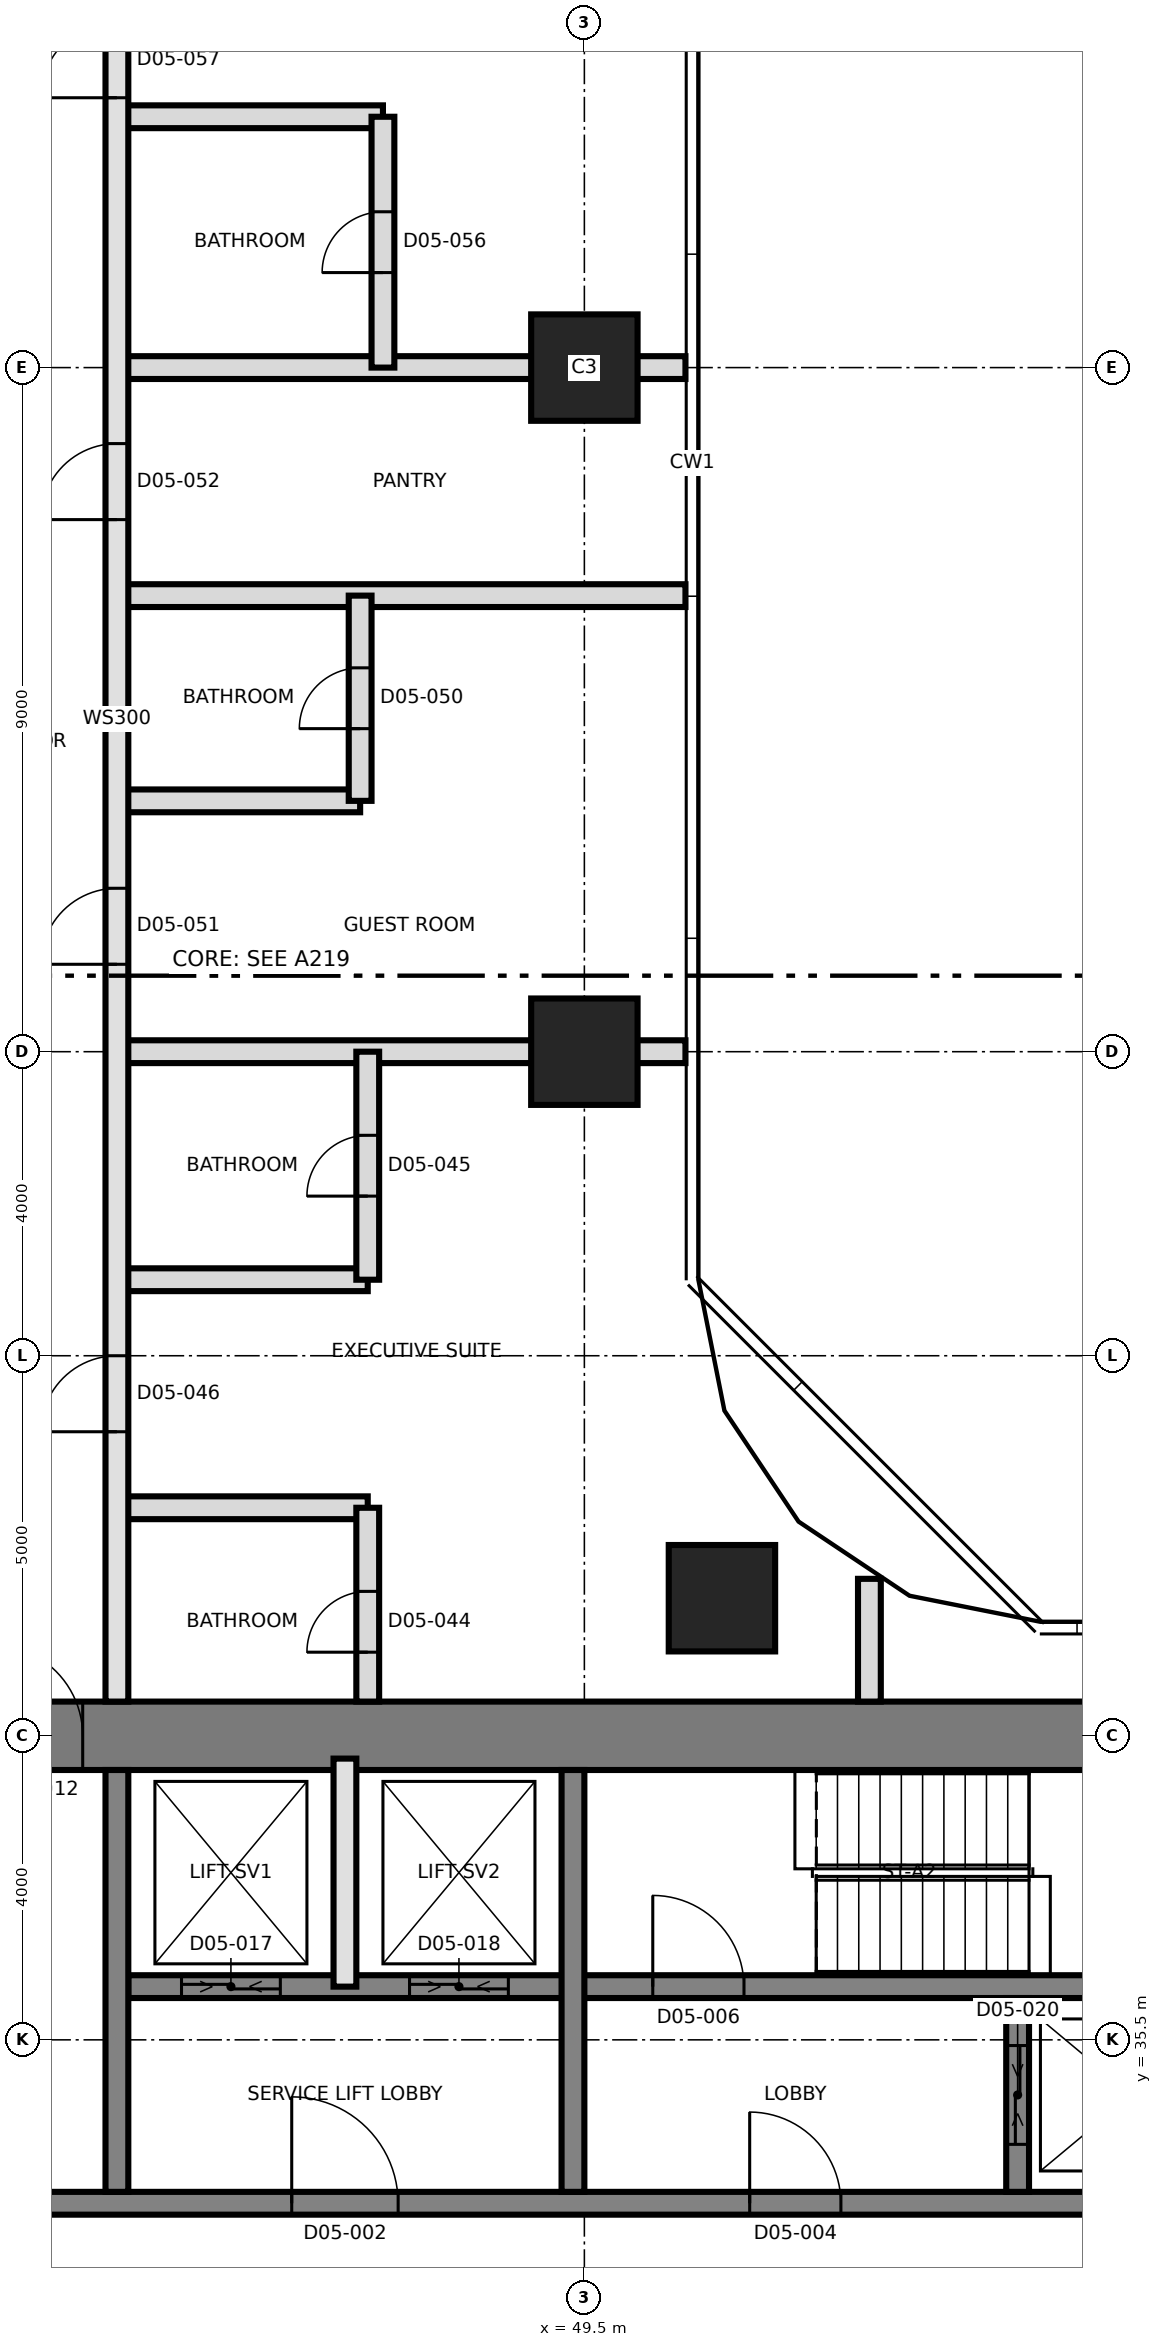
"""IFC4 building model, lengths in metres.
Left out: names, types, materials, properties, quantities, classifications, styles, units other than length and angle.
Written with IfcOpenShell. Run it as: python <this file> out.ifc"""

import sys

from ifc_helpers import new_model, si_unit, direction, frame, frame_2d, origin, origin_2d, place, context, subcontext, project, spatial, rectangle, extrude, element, fill, save


model = new_model("IFC4")
c1 = context("Model", 3, precision=1e-05, world=origin(), true_north=direction((0.0, 1.0)))
c2 = subcontext(c1, "Body", "Model", "MODEL_VIEW")
j1 = project(units=[si_unit("LENGTHUNIT", "METRE"), si_unit("PLANEANGLEUNIT", "RADIAN")], contexts=[c1])
p1 = place(None, origin())
s1 = spatial("IfcSite", under=j1, at=p1, CompositionType="ELEMENT")
p2 = place(p1, origin())
s2 = spatial("IfcBuilding", under=s1, at=p2, CompositionType="ELEMENT")
p3 = place(p2, frame((0.0, 0.0, 70.5)))
s3 = spatial("IfcBuildingStorey", under=s2, at=p3, CompositionType="ELEMENT", Elevation=70.5)
p4 = place(p3, frame((31.05, 39.5, 0.0), z_axis=(0.0, 0.0, 1.0), x_axis=(1.0, 0.0, 0.0)))
e1 = element("IfcWall", 1, at=p4, inside=s3, PredefinedType="SHEAR", context=c2, shape_type="SweptSolid", body=[
    extrude(rectangle(XDim=27.0, YDim=0.9, at=frame_2d((13.5, 0.0))), origin(), (0.0, 0.0, 1.0), 3.7),
])
p5 = place(p4, frame((10.65, 0.0, 0.0)))
e2 = element("IfcOpeningElement", 2, at=p5, cuts=e1, PredefinedType="OPENING", context=c2, shape_type="SweptSolid", body=[
    extrude(rectangle(XDim=1.2, YDim=2.1, at=frame_2d((0.6, 1.05))), frame((0.0, 0.46, 0.0), z_axis=(0.0, -1.0, 0.0), x_axis=(1.0, 0.0, 0.0)), (0.0, 0.0, 1.0), 0.92),
])
p6 = place(p3, frame((31.95, 33.35, 0.0), z_axis=(0.0, 0.0, 1.0), x_axis=(1.0, 0.0, 0.0)))
e3 = element("IfcWall", 3, at=p6, inside=s3, PredefinedType="SHEAR", context=c2, shape_type="SweptSolid", body=[
    extrude(rectangle(XDim=26.1, YDim=0.3, at=frame_2d((13.05, 0.0))), origin(), (0.0, 0.0, 1.0), 3.7),
])
p7 = place(p6, frame((13.7, 0.0, 0.0)))
e4 = element("IfcOpeningElement", 4, at=p7, cuts=e3, PredefinedType="OPENING", context=c2, shape_type="SweptSolid", body=[
    extrude(rectangle(XDim=1.4, YDim=2.1, at=frame_2d((0.7, 1.05))), frame((0.0, 0.16, 0.0), z_axis=(0.0, -1.0, 0.0), x_axis=(1.0, 0.0, 0.0)), (0.0, 0.0, 1.0), 0.32),
])
p8 = place(p6, frame((5.175, 0.0, 0.0)))
e5 = element("IfcOpeningElement", 5, at=p8, cuts=e3, PredefinedType="OPENING", context=c2, shape_type="SweptSolid", body=[
    extrude(rectangle(XDim=1.2, YDim=2.1, at=frame_2d((0.6, 1.05))), frame((0.0, 0.16, 0.0), z_axis=(0.0, -1.0, 0.0), x_axis=(1.0, 0.0, 0.0)), (0.0, 0.0, 1.0), 0.32),
])
p9 = place(p6, frame((19.725, 0.0, 0.0)))
e6 = element("IfcOpeningElement", 6, at=p9, cuts=e3, PredefinedType="OPENING", context=c2, shape_type="SweptSolid", body=[
    extrude(rectangle(XDim=1.2, YDim=2.1, at=frame_2d((0.6, 1.05))), frame((0.0, 0.16, 0.0), z_axis=(0.0, -1.0, 0.0), x_axis=(1.0, 0.0, 0.0)), (0.0, 0.0, 1.0), 0.32),
])
p10 = place(p3, frame((43.5, 36.2, 0.0), z_axis=(0.0, 0.0, 1.0), x_axis=(1.0, 0.0, 0.0)))
e7 = element("IfcWall", 7, at=p10, inside=s3, PredefinedType="SHEAR", context=c2, shape_type="SweptSolid", body=[
    extrude(rectangle(XDim=14.55, YDim=0.3, at=frame_2d((7.275, 0.0))), origin(), (0.0, 0.0, 1.0), 3.7),
])
p11 = place(p10, frame((6.9, 0.0, 0.0)))
e8 = element("IfcOpeningElement", 8, at=p11, cuts=e7, PredefinedType="OPENING", context=c2, shape_type="SweptSolid", body=[
    extrude(rectangle(XDim=1.2, YDim=2.1, at=frame_2d((0.6, 1.05))), frame((0.0, 0.16, 0.0), z_axis=(0.0, -1.0, 0.0), x_axis=(1.0, 0.0, 0.0)), (0.0, 0.0, 1.0), 0.32),
])
p12 = place(p10, frame((0.7, 0.0, 0.0)))
e9 = element("IfcOpeningElement", 9, at=p12, cuts=e7, PredefinedType="OPENING", context=c2, shape_type="SweptSolid", body=[
    extrude(rectangle(XDim=1.3, YDim=2.4, at=frame_2d((0.65, 1.2))), frame((0.0, 0.16, 0.0), z_axis=(0.0, -1.0, 0.0), x_axis=(1.0, 0.0, 0.0)), (0.0, 0.0, 1.0), 0.32),
])
p13 = place(p10, frame((3.7, 0.0, 0.0)))
e10 = element("IfcOpeningElement", 10, at=p13, cuts=e7, PredefinedType="OPENING", context=c2, shape_type="SweptSolid", body=[
    extrude(rectangle(XDim=1.3, YDim=2.4, at=frame_2d((0.65, 1.2))), frame((0.0, 0.16, 0.0), z_axis=(0.0, -1.0, 0.0), x_axis=(1.0, 0.0, 0.0)), (0.0, 0.0, 1.0), 0.32),
])
for number, where, z_axis, x_axis in (
    (11, (43.35, 33.5, 0.0), (0.0, 0.0, 1.0), (0.0, 1.0, 0.0)),
    (12, (49.35, 33.5, 0.0), (0.0, 0.0, 1.0), (0.0, 1.0, 0.0)),
):
    element("IfcWall", number, at=place(p3, frame(where, z_axis=z_axis, x_axis=x_axis)), inside=s3, PredefinedType="SHEAR", context=c2, shape_type="SweptSolid", body=[
        extrude(rectangle(XDim=5.55, YDim=0.3, at=frame_2d((2.775, 0.0))), origin(), (0.0, 0.0, 1.0), 3.7),
    ])
p14 = place(p3, frame((55.2, 33.5, 0.0), z_axis=(0.0, 0.0, 1.0), x_axis=(0.0, 1.0, 0.0)))
e13 = element("IfcWall", 13, at=p14, inside=s3, PredefinedType="SHEAR", context=c2, shape_type="SweptSolid", body=[
    extrude(rectangle(XDim=2.55, YDim=0.3, at=frame_2d((1.275, 0.0))), origin(), (0.0, 0.0, 1.0), 3.7),
])
p15 = place(p14, frame((0.625, 0.0, 0.0)))
e14 = element("IfcOpeningElement", 14, at=p15, cuts=e13, PredefinedType="OPENING", context=c2, shape_type="SweptSolid", body=[
    extrude(rectangle(XDim=1.3, YDim=2.4, at=frame_2d((0.65, 1.2))), frame((0.0, 0.16, 0.0), z_axis=(0.0, -1.0, 0.0), x_axis=(1.0, 0.0, 0.0)), (0.0, 0.0, 1.0), 0.32),
])
for number, where, z_axis, x_axis in (
    (15, (51.31, 41.31, 0.0), (0.0, 0.0, 1.0), (1.0, 0.0, 0.0)),
    (16, (49.5, 48.5, 0.0), (0.0, 0.0, 1.0), (1.0, 0.0, 0.0)),
    (17, (49.5, 57.5, 0.0), (0.0, 0.0, 1.0), (1.0, 0.0, 0.0)),
):
    element("IfcColumn", number, at=place(p3, frame(where, z_axis=z_axis, x_axis=x_axis)), inside=s3, PredefinedType="COLUMN", context=c2, shape_type="SweptSolid", body=[
        extrude(rectangle(XDim=1.4, YDim=1.4, at=origin_2d()), origin(), (0.0, 0.0, 1.0), 3.7),
    ])
p16 = place(p3, frame((46.35, 36.2, 0.0), z_axis=(0.0, 0.0, 1.0), x_axis=(0.0, 1.0, 0.0)))
e18 = element("IfcWall", 18, at=p16, inside=s3, PredefinedType="SOLIDWALL", context=c2, shape_type="SweptSolid", body=[
    extrude(rectangle(XDim=3.0, YDim=0.3, at=frame_2d((1.5, 0.0))), origin(), (0.0, 0.0, 1.0), 3.4),
])
for number, where, z_axis, x_axis in (
    (19, (43.35, 42.5, 0.0), (0.0, 0.0, 1.0), (1.0, 0.0, 0.0)),
    (20, (43.35, 45.5, 0.0), (0.0, 0.0, 1.0), (1.0, 0.0, 0.0)),
):
    element("IfcWall", number, at=place(p3, frame(where, z_axis=z_axis, x_axis=x_axis)), inside=s3, PredefinedType="PARTITIONING", context=c2, shape_type="SweptSolid", body=[
        extrude(rectangle(XDim=3.3, YDim=0.3, at=frame_2d((1.65, 0.0))), origin(), (0.0, 0.0, 1.0), 3.4),
    ])
p17 = place(p3, frame((43.35, 48.5, 0.0), z_axis=(0.0, 0.0, 1.0), x_axis=(1.0, 0.0, 0.0)))
e21 = element("IfcWall", 21, at=p17, inside=s3, PredefinedType="PARTITIONING", context=c2, shape_type="SweptSolid", body=[
    extrude(rectangle(XDim=7.48, YDim=0.3, at=frame_2d((3.74, 0.0))), origin(), (0.0, 0.0, 1.0), 3.4),
])
p18 = place(p3, frame((43.35, 51.8, 0.0), z_axis=(0.0, 0.0, 1.0), x_axis=(1.0, 0.0, 0.0)))
e22 = element("IfcWall", 22, at=p18, inside=s3, PredefinedType="PARTITIONING", context=c2, shape_type="SweptSolid", body=[
    extrude(rectangle(XDim=3.2, YDim=0.3, at=frame_2d((1.6, 0.0))), origin(), (0.0, 0.0, 1.0), 3.4),
])
for number, where, z_axis, x_axis in (
    (23, (43.35, 54.5, 0.0), (0.0, 0.0, 1.0), (1.0, 0.0, 0.0)),
    (24, (43.35, 57.5, 0.0), (0.0, 0.0, 1.0), (1.0, 0.0, 0.0)),
):
    element("IfcWall", number, at=place(p3, frame(where, z_axis=z_axis, x_axis=x_axis)), inside=s3, PredefinedType="PARTITIONING", context=c2, shape_type="SweptSolid", body=[
        extrude(rectangle(XDim=7.48, YDim=0.3, at=frame_2d((3.74, 0.0))), origin(), (0.0, 0.0, 1.0), 3.4),
    ])
p19 = place(p3, frame((43.35, 60.8, 0.0), z_axis=(0.0, 0.0, 1.0), x_axis=(1.0, 0.0, 0.0)))
e25 = element("IfcWall", 25, at=p19, inside=s3, PredefinedType="PARTITIONING", context=c2, shape_type="SweptSolid", body=[
    extrude(rectangle(XDim=3.5, YDim=0.3, at=frame_2d((1.75, 0.0))), origin(), (0.0, 0.0, 1.0), 3.4),
])
p20 = place(p3, frame((43.35, 39.95, 0.0), z_axis=(0.0, 0.0, 1.0), x_axis=(0.0, 1.0, 0.0)))
e26 = element("IfcWall", 26, at=p20, inside=s3, PredefinedType="SOLIDWALL", context=c2, shape_type="SweptSolid", body=[
    extrude(rectangle(XDim=25.85, YDim=0.3, at=frame_2d((12.925, 0.0))), origin(), (0.0, 0.0, 1.0), 3.4),
])
p21 = place(p20, frame((3.55, 0.0, 0.0)))
e27 = element("IfcOpeningElement", 27, at=p21, cuts=e26, PredefinedType="OPENING", context=c2, shape_type="SweptSolid", body=[
    extrude(rectangle(XDim=1.0, YDim=2.4, at=frame_2d((0.5, 1.2))), frame((0.0, 0.16, 0.0), z_axis=(0.0, -1.0, 0.0), x_axis=(1.0, 0.0, 0.0)), (0.0, 0.0, 1.0), 0.32),
])
p22 = place(p20, frame((9.7, 0.0, 0.0)))
e28 = element("IfcOpeningElement", 28, at=p22, cuts=e26, PredefinedType="OPENING", context=c2, shape_type="SweptSolid", body=[
    extrude(rectangle(XDim=1.0, YDim=2.1, at=frame_2d((0.5, 1.05))), frame((0.0, 0.16, 0.0), z_axis=(0.0, -1.0, 0.0), x_axis=(1.0, 0.0, 0.0)), (0.0, 0.0, 1.0), 0.32),
])
p23 = place(p20, frame((15.55, 0.0, 0.0)))
e29 = element("IfcOpeningElement", 29, at=p23, cuts=e26, PredefinedType="OPENING", context=c2, shape_type="SweptSolid", body=[
    extrude(rectangle(XDim=1.0, YDim=2.1, at=frame_2d((0.5, 1.05))), frame((0.0, 0.16, 0.0), z_axis=(0.0, -1.0, 0.0), x_axis=(1.0, 0.0, 0.0)), (0.0, 0.0, 1.0), 0.32),
])
p24 = place(p20, frame((21.1, 0.0, 0.0)))
e30 = element("IfcOpeningElement", 30, at=p24, cuts=e26, PredefinedType="OPENING", context=c2, shape_type="SweptSolid", body=[
    extrude(rectangle(XDim=1.0, YDim=2.4, at=frame_2d((0.5, 1.2))), frame((0.0, 0.16, 0.0), z_axis=(0.0, -1.0, 0.0), x_axis=(1.0, 0.0, 0.0)), (0.0, 0.0, 1.0), 0.32),
])
p25 = place(p3, frame((46.55, 51.8, 0.0), z_axis=(0.0, 0.0, 1.0), x_axis=(0.0, 1.0, 0.0)))
e31 = element("IfcWall", 31, at=p25, inside=s3, PredefinedType="PARTITIONING", context=c2, shape_type="SweptSolid", body=[
    extrude(rectangle(XDim=2.7, YDim=0.3, at=frame_2d((1.35, 0.0))), origin(), (0.0, 0.0, 1.0), 3.4),
])
p26 = place(p25, frame((0.95, 0.0, 0.0)))
e32 = element("IfcOpeningElement", 32, at=p26, cuts=e31, PredefinedType="OPENING", context=c2, shape_type="SweptSolid", body=[
    extrude(rectangle(XDim=0.8, YDim=2.1, at=frame_2d((0.4, 1.05))), frame((0.0, 0.16, 0.0), z_axis=(0.0, -1.0, 0.0), x_axis=(1.0, 0.0, 0.0)), (0.0, 0.0, 1.0), 0.32),
])
p27 = place(p3, frame((46.65, 39.95, 0.0), z_axis=(0.0, 0.0, 1.0), x_axis=(0.0, 1.0, 0.0)))
e33 = element("IfcWall", 33, at=p27, inside=s3, PredefinedType="PARTITIONING", context=c2, shape_type="SweptSolid", body=[
    extrude(rectangle(XDim=2.55, YDim=0.3, at=frame_2d((1.275, 0.0))), origin(), (0.0, 0.0, 1.0), 3.4),
])
p28 = place(p27, frame((0.65, 0.0, 0.0)))
e34 = element("IfcOpeningElement", 34, at=p28, cuts=e33, PredefinedType="OPENING", context=c2, shape_type="SweptSolid", body=[
    extrude(rectangle(XDim=0.8, YDim=2.1, at=frame_2d((0.4, 1.05))), frame((0.0, 0.16, 0.0), z_axis=(0.0, -1.0, 0.0), x_axis=(1.0, 0.0, 0.0)), (0.0, 0.0, 1.0), 0.32),
])
p29 = place(p3, frame((46.65, 45.5, 0.0), z_axis=(0.0, 0.0, 1.0), x_axis=(0.0, 1.0, 0.0)))
e35 = element("IfcWall", 35, at=p29, inside=s3, PredefinedType="PARTITIONING", context=c2, shape_type="SweptSolid", body=[
    extrude(rectangle(XDim=3.0, YDim=0.3, at=frame_2d((1.5, 0.0))), origin(), (0.0, 0.0, 1.0), 3.4),
])
p30 = place(p29, frame((1.1, 0.0, 0.0)))
e36 = element("IfcOpeningElement", 36, at=p30, cuts=e35, PredefinedType="OPENING", context=c2, shape_type="SweptSolid", body=[
    extrude(rectangle(XDim=0.8, YDim=2.1, at=frame_2d((0.4, 1.05))), frame((0.0, 0.16, 0.0), z_axis=(0.0, -1.0, 0.0), x_axis=(1.0, 0.0, 0.0)), (0.0, 0.0, 1.0), 0.32),
])
p31 = place(p3, frame((46.85, 57.5, 0.0), z_axis=(0.0, 0.0, 1.0), x_axis=(0.0, 1.0, 0.0)))
e37 = element("IfcWall", 37, at=p31, inside=s3, PredefinedType="PARTITIONING", context=c2, shape_type="SweptSolid", body=[
    extrude(rectangle(XDim=3.3, YDim=0.3, at=frame_2d((1.65, 0.0))), origin(), (0.0, 0.0, 1.0), 3.4),
])
p32 = place(p31, frame((1.25, 0.0, 0.0)))
e38 = element("IfcOpeningElement", 38, at=p32, cuts=e37, PredefinedType="OPENING", context=c2, shape_type="SweptSolid", body=[
    extrude(rectangle(XDim=0.8, YDim=2.1, at=frame_2d((0.4, 1.05))), frame((0.0, 0.16, 0.0), z_axis=(0.0, -1.0, 0.0), x_axis=(1.0, 0.0, 0.0)), (0.0, 0.0, 1.0), 0.32),
])
p33 = place(p3, frame((53.25, 39.95, 0.0), z_axis=(0.0, 0.0, 1.0), x_axis=(0.0, 1.0, 0.0)))
e39 = element("IfcWall", 39, at=p33, inside=s3, PredefinedType="PARTITIONING", context=c2, shape_type="SweptSolid", body=[
    extrude(rectangle(XDim=1.615, YDim=0.3, at=frame_2d((0.808, 0.0))), origin(), (0.0, 0.0, 1.0), 3.4),
])
p34 = place(p7, origin())
e40 = element("IfcDoor", 40, at=p34, inside=s3, OperationType="SINGLE_SWING_RIGHT", PredefinedType="DOOR", context=c2, shape_type="SweptSolid", body=[
    extrude(rectangle(XDim=1.4, YDim=2.1, at=frame_2d((0.7, 1.05))), frame((0.0, 0.025, 0.0), z_axis=(0.0, -1.0, 0.0), x_axis=(1.0, 0.0, 0.0)), (0.0, 0.0, 1.0), 0.05),
])
fill(e4, e40)
p35 = place(p9, origin())
e41 = element("IfcDoor", 41, at=p35, inside=s3, OperationType="SINGLE_SWING_RIGHT", PredefinedType="DOOR", context=c2, shape_type="SweptSolid", body=[
    extrude(rectangle(XDim=1.2, YDim=2.1, at=frame_2d((0.6, 1.05))), frame((0.0, 0.025, 0.0), z_axis=(0.0, -1.0, 0.0), x_axis=(1.0, 0.0, 0.0)), (0.0, 0.0, 1.0), 0.05),
])
fill(e6, e41)
p36 = place(p11, origin())
e42 = element("IfcDoor", 42, at=p36, inside=s3, OperationType="SINGLE_SWING_LEFT", PredefinedType="DOOR", context=c2, shape_type="SweptSolid", body=[
    extrude(rectangle(XDim=1.2, YDim=2.1, at=frame_2d((0.6, 1.05))), frame((0.0, 0.025, 0.0), z_axis=(0.0, -1.0, 0.0), x_axis=(1.0, 0.0, 0.0)), (0.0, 0.0, 1.0), 0.05),
])
fill(e8, e42)
p37 = place(p5, origin())
e43 = element("IfcDoor", 43, at=p37, inside=s3, OperationType="SINGLE_SWING_RIGHT", PredefinedType="DOOR", context=c2, shape_type="SweptSolid", body=[
    extrude(rectangle(XDim=1.2, YDim=2.1, at=frame_2d((0.6, 1.05))), frame((0.0, 0.025, 0.0), z_axis=(0.0, -1.0, 0.0), x_axis=(1.0, 0.0, 0.0)), (0.0, 0.0, 1.0), 0.05),
])
fill(e2, e43)
p38 = place(p12, origin())
e44 = element("IfcDoor", 44, at=p38, inside=s3, OperationType="SLIDING_TO_LEFT", PredefinedType="DOOR", context=c2, shape_type="SweptSolid", body=[
    extrude(rectangle(XDim=1.3, YDim=2.4, at=frame_2d((0.65, 1.2))), frame((0.0, 0.025, 0.0), z_axis=(0.0, -1.0, 0.0), x_axis=(1.0, 0.0, 0.0)), (0.0, 0.0, 1.0), 0.05),
])
fill(e9, e44)
p39 = place(p13, origin())
e45 = element("IfcDoor", 45, at=p39, inside=s3, OperationType="SLIDING_TO_LEFT", PredefinedType="DOOR", context=c2, shape_type="SweptSolid", body=[
    extrude(rectangle(XDim=1.3, YDim=2.4, at=frame_2d((0.65, 1.2))), frame((0.0, 0.025, 0.0), z_axis=(0.0, -1.0, 0.0), x_axis=(1.0, 0.0, 0.0)), (0.0, 0.0, 1.0), 0.05),
])
fill(e10, e45)
p40 = place(p15, origin())
e46 = element("IfcDoor", 46, at=p40, inside=s3, OperationType="SLIDING_TO_LEFT", PredefinedType="DOOR", context=c2, shape_type="SweptSolid", body=[
    extrude(rectangle(XDim=1.3, YDim=2.4, at=frame_2d((0.65, 1.2))), frame((0.0, 0.025, 0.0), z_axis=(0.0, -1.0, 0.0), x_axis=(1.0, 0.0, 0.0)), (0.0, 0.0, 1.0), 0.05),
])
fill(e14, e46)
p41 = place(p28, origin())
e47 = element("IfcDoor", 47, at=p41, inside=s3, OperationType="SINGLE_SWING_LEFT", PredefinedType="DOOR", context=c2, shape_type="SweptSolid", body=[
    extrude(rectangle(XDim=0.8, YDim=2.1, at=frame_2d((0.4, 1.05))), frame((0.0, 0.025, 0.0), z_axis=(0.0, -1.0, 0.0), x_axis=(1.0, 0.0, 0.0)), (0.0, 0.0, 1.0), 0.05),
])
fill(e34, e47)
p42 = place(p30, origin())
e48 = element("IfcDoor", 48, at=p42, inside=s3, OperationType="SINGLE_SWING_RIGHT", PredefinedType="DOOR", context=c2, shape_type="SweptSolid", body=[
    extrude(rectangle(XDim=0.8, YDim=2.1, at=frame_2d((0.4, 1.05))), frame((0.0, 0.025, 0.0), z_axis=(0.0, -1.0, 0.0), x_axis=(1.0, 0.0, 0.0)), (0.0, 0.0, 1.0), 0.05),
])
fill(e36, e48)
p43 = place(p21, origin())
e49 = element("IfcDoor", 49, at=p43, inside=s3, OperationType="SINGLE_SWING_LEFT", PredefinedType="DOOR", context=c2, shape_type="SweptSolid", body=[
    extrude(rectangle(XDim=1.0, YDim=2.4, at=frame_2d((0.5, 1.2))), frame((0.0, 0.025, 0.0), z_axis=(0.0, -1.0, 0.0), x_axis=(1.0, 0.0, 0.0)), (0.0, 0.0, 1.0), 0.05),
])
fill(e27, e49)
p44 = place(p26, origin())
e50 = element("IfcDoor", 50, at=p44, inside=s3, OperationType="SINGLE_SWING_LEFT", PredefinedType="DOOR", context=c2, shape_type="SweptSolid", body=[
    extrude(rectangle(XDim=0.8, YDim=2.1, at=frame_2d((0.4, 1.05))), frame((0.0, 0.025, 0.0), z_axis=(0.0, -1.0, 0.0), x_axis=(1.0, 0.0, 0.0)), (0.0, 0.0, 1.0), 0.05),
])
fill(e32, e50)
p45 = place(p22, origin())
e51 = element("IfcDoor", 51, at=p45, inside=s3, OperationType="SINGLE_SWING_LEFT", PredefinedType="DOOR", context=c2, shape_type="SweptSolid", body=[
    extrude(rectangle(XDim=1.0, YDim=2.1, at=frame_2d((0.5, 1.05))), frame((0.0, 0.025, 0.0), z_axis=(0.0, -1.0, 0.0), x_axis=(1.0, 0.0, 0.0)), (0.0, 0.0, 1.0), 0.05),
])
fill(e28, e51)
p46 = place(p23, origin())
e52 = element("IfcDoor", 52, at=p46, inside=s3, OperationType="SINGLE_SWING_RIGHT", PredefinedType="DOOR", context=c2, shape_type="SweptSolid", body=[
    extrude(rectangle(XDim=1.0, YDim=2.1, at=frame_2d((0.5, 1.05))), frame((0.0, 0.025, 0.0), z_axis=(0.0, -1.0, 0.0), x_axis=(1.0, 0.0, 0.0)), (0.0, 0.0, 1.0), 0.05),
])
fill(e29, e52)
p47 = place(p32, origin())
e53 = element("IfcDoor", 53, at=p47, inside=s3, OperationType="SINGLE_SWING_LEFT", PredefinedType="DOOR", context=c2, shape_type="SweptSolid", body=[
    extrude(rectangle(XDim=0.8, YDim=2.1, at=frame_2d((0.4, 1.05))), frame((0.0, 0.025, 0.0), z_axis=(0.0, -1.0, 0.0), x_axis=(1.0, 0.0, 0.0)), (0.0, 0.0, 1.0), 0.05),
])
fill(e38, e53)
p48 = place(p24, origin())
e54 = element("IfcDoor", 54, at=p48, inside=s3, OperationType="SINGLE_SWING_LEFT", PredefinedType="DOOR", context=c2, shape_type="SweptSolid", body=[
    extrude(rectangle(XDim=1.0, YDim=2.4, at=frame_2d((0.5, 1.2))), frame((0.0, 0.025, 0.0), z_axis=(0.0, -1.0, 0.0), x_axis=(1.0, 0.0, 0.0)), (0.0, 0.0, 1.0), 0.05),
])
fill(e30, e54)
save(model, sys.argv[1])
